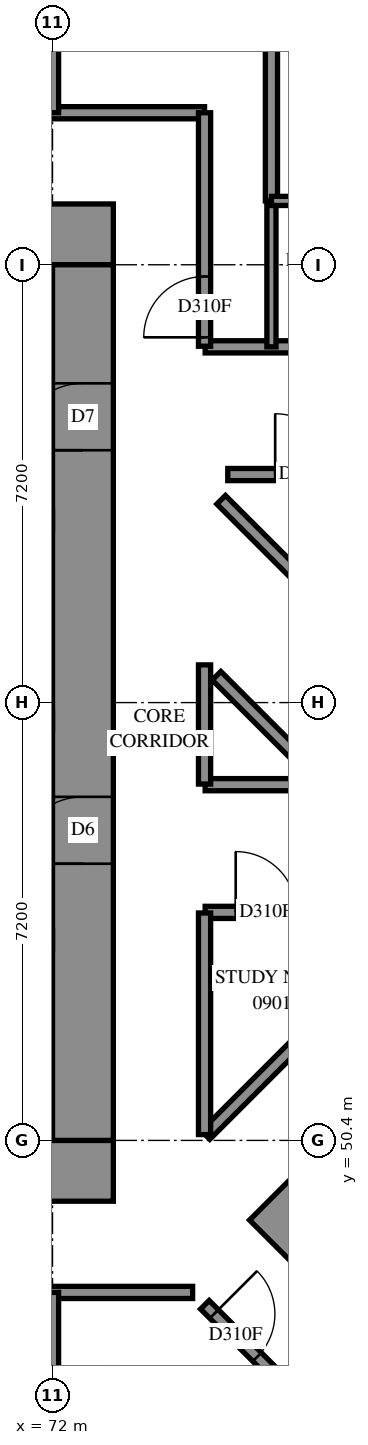
"""IFC4 building model, lengths in metres.
Left out: names, types, materials, properties, quantities, classifications, styles, units other than length and angle.
Written with IfcOpenShell. Run it as: python <this file> out.ifc"""

import sys

from ifc_helpers import new_model, si_unit, direction, frame, frame_2d, origin, place, context, subcontext, project, spatial, rectangle, extrude, element, fill, save


model = new_model("IFC4")
c1 = context("Model", 3, precision=1e-05, world=origin(), true_north=direction((0.0, 1.0)))
c2 = subcontext(c1, "Body", "Model", "MODEL_VIEW")
j1 = project(units=[si_unit("LENGTHUNIT", "METRE"), si_unit("PLANEANGLEUNIT", "RADIAN")], contexts=[c1])
p1 = place(None, origin())
s1 = spatial("IfcSite", under=j1, at=p1, CompositionType="ELEMENT")
p2 = place(p1, origin())
s2 = spatial("IfcBuilding", under=s1, at=p2, CompositionType="ELEMENT")
p3 = place(p2, frame((0.0, 0.0, 37.2)))
s3 = spatial("IfcBuildingStorey", under=s2, at=p3, CompositionType="ELEMENT", Elevation=37.2)
p4 = place(p3, frame((56.6, 49.9, -0.3), z_axis=(0.0, 0.0, 1.0), x_axis=(1.0, 0.0, 0.0)))
e1 = element("IfcWall", 1, at=p4, inside=s3, PredefinedType="SHEAR", context=c2, shape_type="SweptSolid", body=[
    extrude(rectangle(XDim=16.4, YDim=1.0, at=frame_2d((8.2, 0.0))), origin(), (0.0, 0.0, 1.0), 2.7),
])
p5 = place(p3, frame((56.6, 65.3, -0.3), z_axis=(0.0, 0.0, 1.0), x_axis=(1.0, 0.0, 0.0)))
e2 = element("IfcWall", 2, at=p5, inside=s3, PredefinedType="SHEAR", context=c2, shape_type="SweptSolid", body=[
    extrude(rectangle(XDim=16.4, YDim=1.0, at=frame_2d((8.2, 0.0))), origin(), (0.0, 0.0, 1.0), 2.7),
])
p6 = place(p5, frame((11.0, 0.0, 0.3)))
e3 = element("IfcOpeningElement", 3, at=p6, cuts=e2, PredefinedType="OPENING", context=c2, shape_type="SweptSolid", body=[
    extrude(rectangle(XDim=0.8, YDim=2.1, at=frame_2d((0.4, 1.05))), frame((0.0, 0.51, 0.0), z_axis=(0.0, -1.0, 0.0), x_axis=(1.0, 0.0, 0.0)), (0.0, 0.0, 1.0), 1.02),
])
p7 = place(p3, frame((72.5, 50.4, -0.3), z_axis=(0.0, 0.0, 1.0), x_axis=(0.0, 1.0, 0.0)))
e4 = element("IfcWall", 4, at=p7, inside=s3, PredefinedType="SHEAR", context=c2, shape_type="SweptSolid", body=[
    extrude(rectangle(XDim=14.4, YDim=1.0, at=frame_2d((7.2, 0.0))), origin(), (0.0, 0.0, 1.0), 2.7),
])
p8 = place(p7, frame((4.55, 0.0, 0.3)))
e5 = element("IfcOpeningElement", 5, at=p8, cuts=e4, PredefinedType="OPENING", context=c2, shape_type="SweptSolid", body=[
    extrude(rectangle(XDim=1.1, YDim=2.1, at=frame_2d((0.55, 1.05))), frame((0.0, 0.51, 0.0), z_axis=(0.0, -1.0, 0.0), x_axis=(1.0, 0.0, 0.0)), (0.0, 0.0, 1.0), 1.02),
])
p9 = place(p7, frame((11.35, 0.0, 0.3)))
e6 = element("IfcOpeningElement", 6, at=p9, cuts=e4, PredefinedType="OPENING", context=c2, shape_type="SweptSolid", body=[
    extrude(rectangle(XDim=1.1, YDim=2.1, at=frame_2d((0.55, 1.05))), frame((0.0, 0.51, 0.0), z_axis=(0.0, -1.0, 0.0), x_axis=(1.0, 0.0, 0.0)), (0.0, 0.0, 1.0), 1.02),
])
p10 = place(p3, frame((75.594, 49.443, -0.3), z_axis=(0.0, 0.0, 1.0), x_axis=(0.7071037324, -0.70710983, 0.0)))
e7 = element("IfcWall", 7, at=p10, inside=s3, PredefinedType="SHEAR", context=c2, shape_type="SweptSolid", body=[
    extrude(rectangle(XDim=16.4, YDim=1.0, at=frame_2d((8.2, 0.0))), origin(), (0.0, 0.0, 1.0), 2.7),
])
p11 = place(p3, frame((55.1, 67.3, 0.0), z_axis=(0.0, 0.0, 1.0), x_axis=(1.0, 0.0, 0.0)))
e8 = element("IfcWall", 8, at=p11, inside=s3, PredefinedType="PARTITIONING", context=c2, shape_type="SweptSolid", body=[
    extrude(rectangle(XDim=19.4, YDim=0.2, at=frame_2d((9.7, 0.0))), origin(), (0.0, 0.0, 1.0), 3.1),
])
p12 = place(p11, frame((6.399, 0.0, 0.0)))
e9 = element("IfcOpeningElement", 9, at=p12, cuts=e8, PredefinedType="OPENING", context=c2, shape_type="SweptSolid", body=[
    extrude(rectangle(XDim=0.9, YDim=2.1, at=frame_2d((0.45, 1.05))), frame((0.0, 0.11, 0.0), z_axis=(0.0, -1.0, 0.0), x_axis=(1.0, 0.0, 0.0)), (0.0, 0.0, 1.0), 0.22),
])
p13 = place(p11, frame((13.599, 0.0, 0.0)))
e10 = element("IfcOpeningElement", 10, at=p13, cuts=e8, PredefinedType="OPENING", context=c2, shape_type="SweptSolid", body=[
    extrude(rectangle(XDim=0.9, YDim=2.1, at=frame_2d((0.45, 1.05))), frame((0.0, 0.11, 0.0), z_axis=(0.0, -1.0, 0.0), x_axis=(1.0, 0.0, 0.0)), (0.0, 0.0, 1.0), 0.22),
])
p14 = place(p3, frame((55.1, 47.9, 0.0), z_axis=(0.0, 0.0, 1.0), x_axis=(1.0, 0.0, 0.0)))
e11 = element("IfcWall", 11, at=p14, inside=s3, PredefinedType="PARTITIONING", context=c2, shape_type="SweptSolid", body=[
    extrude(rectangle(XDim=19.204, YDim=0.2, at=frame_2d((9.602, 0.0))), origin(), (0.0, 0.0, 1.0), 3.1),
])
p15 = place(p14, frame((6.399, 0.0, 0.0)))
e12 = element("IfcOpeningElement", 12, at=p15, cuts=e11, PredefinedType="OPENING", context=c2, shape_type="SweptSolid", body=[
    extrude(rectangle(XDim=0.9, YDim=2.1, at=frame_2d((0.45, 1.05))), frame((0.0, 0.11, 0.0), z_axis=(0.0, -1.0, 0.0), x_axis=(1.0, 0.0, 0.0)), (0.0, 0.0, 1.0), 0.22),
])
p16 = place(p14, frame((13.599, 0.0, 0.0)))
e13 = element("IfcOpeningElement", 13, at=p16, cuts=e11, PredefinedType="OPENING", context=c2, shape_type="SweptSolid", body=[
    extrude(rectangle(XDim=0.9, YDim=2.1, at=frame_2d((0.45, 1.05))), frame((0.0, 0.11, 0.0), z_axis=(0.0, -1.0, 0.0), x_axis=(1.0, 0.0, 0.0)), (0.0, 0.0, 1.0), 0.22),
])
p17 = place(p3, frame((75.6, 65.85, 0.0), z_axis=(0.0, 0.0, 1.0), x_axis=(0.0, 1.0, 0.0)))
e14 = element("IfcWall", 14, at=p17, inside=s3, PredefinedType="PARTITIONING", context=c2, shape_type="SweptSolid", body=[
    extrude(rectangle(XDim=6.871, YDim=0.2, at=frame_2d((3.435, 0.0))), origin(), (0.0, 0.0, 1.0), 3.1),
])
p18 = place(p3, frame((74.773, 60.935, 0.0), z_axis=(0.0, 0.0, 1.0), x_axis=(0.7071067812, -0.7071067812, 0.0)))
e15 = element("IfcWall", 15, at=p18, inside=s3, PredefinedType="PARTITIONING", context=c2, shape_type="SweptSolid", body=[
    extrude(rectangle(XDim=5.408, YDim=0.2, at=frame_2d((2.704, 0.0))), origin(), (0.0, 0.0, 1.0), 3.1),
])
p19 = place(p3, frame((74.517, 50.489, 0.0), z_axis=(0.0, 0.0, 1.0), x_axis=(0.7071067812, 0.7071067812, 0.0)))
e16 = element("IfcWall", 16, at=p19, inside=s3, PredefinedType="PARTITIONING", context=c2, shape_type="SweptSolid", body=[
    extrude(rectangle(XDim=5.176, YDim=0.2, at=frame_2d((2.588, 0.0))), origin(), (0.0, 0.0, 1.0), 3.1),
])
p20 = place(p3, frame((74.51, 63.45, 0.0), z_axis=(0.0, 0.0, 1.0), x_axis=(1.0, 0.0, 0.0)))
e17 = element("IfcWall", 17, at=p20, inside=s3, PredefinedType="PARTITIONING", context=c2, shape_type="SweptSolid", body=[
    extrude(rectangle(XDim=4.69, YDim=0.2, at=frame_2d((2.345, 0.0))), origin(), (0.0, 0.0, 1.0), 3.1),
])
p21 = place(p20, frame((3.12, 0.0, 0.0)))
e18 = element("IfcOpeningElement", 18, at=p21, cuts=e17, PredefinedType="OPENING", context=c2, shape_type="SweptSolid", body=[
    extrude(rectangle(XDim=0.9, YDim=2.1, at=frame_2d((0.45, 1.05))), frame((0.0, 0.11, 0.0), z_axis=(0.0, -1.0, 0.0), x_axis=(1.0, 0.0, 0.0)), (0.0, 0.0, 1.0), 0.22),
])
p22 = place(p3, frame((74.882, 61.35, 0.0), z_axis=(0.0, 0.0, 1.0), x_axis=(1.0, 0.0, 0.0)))
e19 = element("IfcWall", 19, at=p22, inside=s3, PredefinedType="PARTITIONING", context=c2, shape_type="SweptSolid", body=[
    extrude(rectangle(XDim=4.318, YDim=0.2, at=frame_2d((2.159, 0.0))), origin(), (0.0, 0.0, 1.0), 3.1),
])
p23 = place(p22, frame((0.78, 0.0, 0.0)))
e20 = element("IfcOpeningElement", 20, at=p23, cuts=e19, PredefinedType="OPENING", context=c2, shape_type="SweptSolid", body=[
    extrude(rectangle(XDim=1.0, YDim=2.1, at=frame_2d((0.5, 1.05))), frame((0.0, 0.11, 0.0), z_axis=(0.0, -1.0, 0.0), x_axis=(1.0, 0.0, 0.0)), (0.0, 0.0, 1.0), 0.22),
])
for number, where, z_axis, x_axis in (
    (21, (72.0, 67.3, 0.0), (0.0, 0.0, 1.0), (0.0, 1.0, 0.0)),
    (22, (72.0, 43.8, 0.0), (0.0, 0.0, 1.0), (0.0, 1.0, 0.0)),
):
    element("IfcWall", number, at=place(p3, frame(where, z_axis=z_axis, x_axis=x_axis)), inside=s3, PredefinedType="PARTITIONING", context=c2, shape_type="SweptSolid", body=[
        extrude(rectangle(XDim=4.1, YDim=0.2, at=frame_2d((2.05, 0.0))), origin(), (0.0, 0.0, 1.0), 3.1),
    ])
p24 = place(p3, frame((74.505, 47.697, 0.0), z_axis=(0.0, 0.0, 1.0), x_axis=(0.7071067812, -0.7071067812, 0.0)))
e23 = element("IfcWall", 23, at=p24, inside=s3, PredefinedType="PARTITIONING", context=c2, shape_type="SweptSolid", body=[
    extrude(rectangle(XDim=4.019, YDim=0.2, at=frame_2d((2.01, 0.0))), origin(), (0.0, 0.0, 1.0), 3.1),
])
p25 = place(p24, frame((0.215, 0.0, 0.0)))
e24 = element("IfcOpeningElement", 24, at=p25, cuts=e23, PredefinedType="OPENING", context=c2, shape_type="SweptSolid", body=[
    extrude(rectangle(XDim=1.0, YDim=2.1, at=frame_2d((0.5, 1.05))), frame((0.0, 0.11, 0.0), z_axis=(0.0, -1.0, 0.0), x_axis=(1.0, 0.0, 0.0)), (0.0, 0.0, 1.0), 0.22),
])
p26 = place(p3, frame((74.5, 63.46, 0.0), z_axis=(0.0, 0.0, 1.0), x_axis=(0.0, 1.0, 0.0)))
e25 = element("IfcWall", 25, at=p26, inside=s3, PredefinedType="PARTITIONING", context=c2, shape_type="SweptSolid", body=[
    extrude(rectangle(XDim=3.84, YDim=0.2, at=frame_2d((1.92, 0.0))), origin(), (0.0, 0.0, 1.0), 3.1),
])
p27 = place(p26, frame((0.147, 0.0, 0.0)))
e26 = element("IfcOpeningElement", 26, at=p27, cuts=e25, PredefinedType="OPENING", context=c2, shape_type="SweptSolid", body=[
    extrude(rectangle(XDim=1.0, YDim=2.1, at=frame_2d((0.5, 1.05))), frame((0.0, 0.11, 0.0), z_axis=(0.0, -1.0, 0.0), x_axis=(1.0, 0.0, 0.0)), (0.0, 0.0, 1.0), 0.22),
])
p28 = place(p3, frame((74.51, 54.15, 0.0), z_axis=(0.0, 0.0, 1.0), x_axis=(1.0, 0.0, 0.0)))
e27 = element("IfcWall", 27, at=p28, inside=s3, PredefinedType="PARTITIONING", context=c2, shape_type="SweptSolid", body=[
    extrude(rectangle(XDim=3.666, YDim=0.2, at=frame_2d((1.833, 0.0))), origin(), (0.0, 0.0, 1.0), 3.1),
])
p29 = place(p28, frame((0.502, 0.0, 0.0)))
e28 = element("IfcOpeningElement", 28, at=p29, cuts=e27, PredefinedType="OPENING", context=c2, shape_type="SweptSolid", body=[
    extrude(rectangle(XDim=1.0, YDim=2.1, at=frame_2d((0.5, 1.05))), frame((0.0, 0.11, 0.0), z_axis=(0.0, -1.0, 0.0), x_axis=(1.0, 0.0, 0.0)), (0.0, 0.0, 1.0), 0.22),
])
p30 = place(p3, frame((74.5, 50.496, 0.0), z_axis=(0.0, 0.0, 1.0), x_axis=(0.0, 1.0, 0.0)))
e29 = element("IfcWall", 29, at=p30, inside=s3, PredefinedType="PARTITIONING", context=c2, shape_type="SweptSolid", body=[
    extrude(rectangle(XDim=3.644, YDim=0.2, at=frame_2d((1.822, 0.0))), origin(), (0.0, 0.0, 1.0), 3.1),
])
p31 = place(p3, frame((74.697, 58.041, 0.0), z_axis=(0.0, 0.0, 1.0), x_axis=(0.7071067812, -0.7071067812, 0.0)))
e30 = element("IfcWall", 30, at=p31, inside=s3, PredefinedType="PARTITIONING", context=c2, shape_type="SweptSolid", body=[
    extrude(rectangle(XDim=2.534, YDim=0.2, at=frame_2d((1.267, 0.0))), origin(), (0.0, 0.0, 1.0), 3.1),
])
p32 = place(p3, frame((75.6, 63.45, 0.0), z_axis=(0.0, 0.0, 1.0), x_axis=(0.0, 1.0, 0.0)))
e31 = element("IfcWall", 31, at=p32, inside=s3, PredefinedType="PARTITIONING", context=c2, shape_type="SweptSolid", body=[
    extrude(rectangle(XDim=2.4, YDim=0.15, at=frame_2d((1.2, 0.0))), origin(), (0.0, 0.0, 1.0), 3.1),
])
p33 = place(p3, frame((74.51, 56.25, 0.0), z_axis=(0.0, 0.0, 1.0), x_axis=(1.0, 0.0, 0.0)))
e32 = element("IfcWall", 32, at=p33, inside=s3, PredefinedType="PARTITIONING", context=c2, shape_type="SweptSolid", body=[
    extrude(rectangle(XDim=1.982, YDim=0.2, at=frame_2d((0.991, 0.0))), origin(), (0.0, 0.0, 1.0), 3.1),
])
p34 = place(p3, frame((74.5, 56.26, 0.0), z_axis=(0.0, 0.0, 1.0), x_axis=(0.0, 1.0, 0.0)))
e33 = element("IfcWall", 33, at=p34, inside=s3, PredefinedType="PARTITIONING", context=c2, shape_type="SweptSolid", body=[
    extrude(rectangle(XDim=1.96, YDim=0.2, at=frame_2d((0.98, 0.0))), origin(), (0.0, 0.0, 1.0), 3.1),
])
p35 = place(p3, frame((75.6, 65.85, 0.0), z_axis=(0.0, 0.0, 1.0), x_axis=(1.0, 0.0, 0.0)))
e34 = element("IfcWall", 34, at=p35, inside=s3, PredefinedType="PARTITIONING", context=c2, shape_type="SweptSolid", body=[
    extrude(rectangle(XDim=1.9, YDim=0.15, at=frame_2d((0.95, 0.0))), origin(), (0.0, 0.0, 1.0), 3.1),
])
p36 = place(p35, frame((0.607, 0.0, 0.0)))
e35 = element("IfcOpeningElement", 35, at=p36, cuts=e34, PredefinedType="OPENING", context=c2, shape_type="SweptSolid", body=[
    extrude(rectangle(XDim=0.8, YDim=2.1, at=frame_2d((0.4, 1.05))), frame((0.0, 0.085, 0.0), z_axis=(0.0, -1.0, 0.0), x_axis=(1.0, 0.0, 0.0)), (0.0, 0.0, 1.0), 0.17),
])
p37 = place(p8, origin())
e36 = element("IfcDoor", 36, at=p37, inside=s3, OperationType="DOUBLE_DOOR_SINGLE_SWING", PredefinedType="DOOR", context=c2, shape_type="SweptSolid", body=[
    extrude(rectangle(XDim=1.1, YDim=2.1, at=frame_2d((0.55, 1.05))), frame((0.0, 0.025, 0.0), z_axis=(0.0, -1.0, 0.0), x_axis=(1.0, 0.0, 0.0)), (0.0, 0.0, 1.0), 0.05),
])
fill(e5, e36)
p38 = place(p9, origin())
e37 = element("IfcDoor", 37, at=p38, inside=s3, OperationType="SINGLE_SWING_RIGHT", PredefinedType="DOOR", context=c2, shape_type="SweptSolid", body=[
    extrude(rectangle(XDim=1.1, YDim=2.1, at=frame_2d((0.55, 1.05))), frame((0.0, 0.025, 0.0), z_axis=(0.0, -1.0, 0.0), x_axis=(1.0, 0.0, 0.0)), (0.0, 0.0, 1.0), 0.05),
])
fill(e6, e37)
p39 = place(p29, origin())
e38 = element("IfcDoor", 38, at=p39, inside=s3, OperationType="SINGLE_SWING_RIGHT", PredefinedType="DOOR", context=c2, shape_type="SweptSolid", body=[
    extrude(rectangle(XDim=1.0, YDim=2.1, at=frame_2d((0.5, 1.05))), frame((0.0, 0.025, 0.0), z_axis=(0.0, -1.0, 0.0), x_axis=(1.0, 0.0, 0.0)), (0.0, 0.0, 1.0), 0.05),
])
fill(e28, e38)
p40 = place(p27, origin())
e39 = element("IfcDoor", 39, at=p40, inside=s3, OperationType="SINGLE_SWING_RIGHT", PredefinedType="DOOR", context=c2, shape_type="SweptSolid", body=[
    extrude(rectangle(XDim=1.0, YDim=2.1, at=frame_2d((0.5, 1.05))), frame((0.0, 0.025, 0.0), z_axis=(0.0, -1.0, 0.0), x_axis=(1.0, 0.0, 0.0)), (0.0, 0.0, 1.0), 0.05),
])
fill(e26, e39)
p41 = place(p25, origin())
e40 = element("IfcDoor", 40, at=p41, inside=s3, OperationType="SINGLE_SWING_LEFT", PredefinedType="DOOR", context=c2, shape_type="SweptSolid", body=[
    extrude(rectangle(XDim=1.0, YDim=2.1, at=frame_2d((0.5, 1.05))), frame((0.0, 0.025, 0.0), z_axis=(0.0, -1.0, 0.0), x_axis=(1.0, 0.0, 0.0)), (0.0, 0.0, 1.0), 0.05),
])
fill(e24, e40)
p42 = place(p23, origin())
e41 = element("IfcDoor", 41, at=p42, inside=s3, OperationType="SINGLE_SWING_RIGHT", PredefinedType="DOOR", context=c2, shape_type="SweptSolid", body=[
    extrude(rectangle(XDim=1.0, YDim=2.1, at=frame_2d((0.5, 1.05))), frame((0.0, 0.025, 0.0), z_axis=(0.0, -1.0, 0.0), x_axis=(1.0, 0.0, 0.0)), (0.0, 0.0, 1.0), 0.05),
])
fill(e20, e41)
save(model, sys.argv[1])
